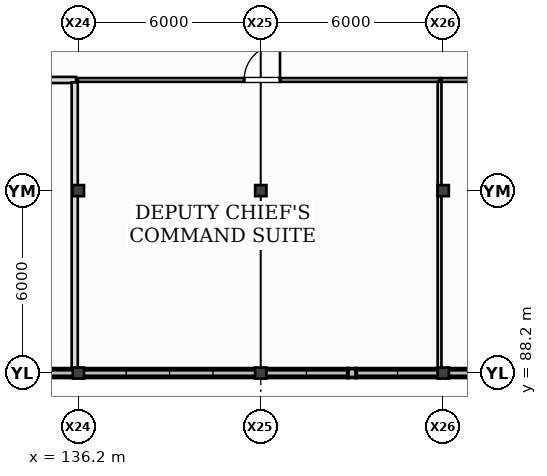
"""IFC4 building model, lengths in metres.
Left out: names, types, materials, properties, quantities, classifications, styles, units other than length and angle.
Written with IfcOpenShell. Run it as: python <this file> out.ifc"""

import sys

from ifc_helpers import new_model, si_unit, direction, frame, frame_2d, origin, origin_2d, place, context, subcontext, project, spatial, rectangle, i_section, extrude, element, fill, save


model = new_model("IFC4")
c1 = context("Model", 3, precision=1e-05, world=origin(), true_north=direction((0.0, 1.0)))
c2 = subcontext(c1, "Body", "Model", "MODEL_VIEW")
j1 = project(units=[si_unit("LENGTHUNIT", "METRE"), si_unit("PLANEANGLEUNIT", "RADIAN")], contexts=[c1])
p1 = place(None, origin())
s1 = spatial("IfcSite", under=j1, at=p1, CompositionType="ELEMENT")
p2 = place(p1, origin())
s2 = spatial("IfcBuilding", under=s1, at=p2, CompositionType="ELEMENT")
p3 = place(p2, frame((0.0, 0.0, 10.0)))
s3 = spatial("IfcBuildingStorey", under=s2, at=p3, CompositionType="ELEMENT", Elevation=10.0)
for number, where, z_axis, x_axis in (
    (1, (136.2, 88.2, 0.0), (0.0, 0.0, 1.0), (1.0, 0.0, 0.0)),
    (2, (136.2, 94.2, 0.0), (0.0, 0.0, 1.0), (1.0, 0.0, 0.0)),
    (3, (142.2, 88.2, 0.0), (0.0, 0.0, 1.0), (1.0, 0.0, 0.0)),
    (4, (142.2, 94.2, 0.0), (0.0, 0.0, 1.0), (1.0, 0.0, 0.0)),
    (5, (148.2, 88.2, 0.0), (0.0, 0.0, 1.0), (1.0, 0.0, 0.0)),
    (6, (148.2, 94.2, 0.0), (0.0, 0.0, 1.0), (1.0, 0.0, 0.0)),
):
    element("IfcColumn", number, at=place(p3, frame(where, z_axis=z_axis, x_axis=x_axis)), inside=s3, PredefinedType="COLUMN", context=c2, shape_type="SweptSolid", body=[
        extrude(i_section(OverallWidth=0.371, OverallDepth=0.364, WebThickness=0.013, FlangeThickness=0.022, at=origin_2d()), origin(), (0.0, 0.0, 1.0), 4.0),
    ])
p4 = place(p3, frame((133.34, 88.2, 0.0), z_axis=(0.0, 0.0, 1.0), x_axis=(1.0, 0.0, 0.0)))
e7 = element("IfcWall", 7, at=p4, inside=s3, PredefinedType="STANDARD", context=c2, shape_type="SweptSolid", body=[
    extrude(rectangle(XDim=2.715, YDim=0.29, at=frame_2d((1.357, 0.0))), origin(), (0.0, 0.0, 1.0), 0.44),
])
p5 = place(p3, frame((136.345, 88.2, 0.0), z_axis=(0.0, 0.0, 1.0), x_axis=(1.0, 0.0, 0.0)))
e8 = element("IfcWall", 8, at=p5, inside=s3, PredefinedType="STANDARD", context=c2, shape_type="SweptSolid", body=[
    extrude(rectangle(XDim=5.71, YDim=0.29, at=frame_2d((2.855, 0.0))), origin(), (0.0, 0.0, 1.0), 0.56),
])
p6 = place(p3, frame((145.06, 88.2, 0.0), z_axis=(0.0, 0.0, 1.0), x_axis=(1.0, 0.0, 0.0)))
e9 = element("IfcWall", 9, at=p6, inside=s3, PredefinedType="STANDARD", context=c2, shape_type="SweptSolid", body=[
    extrude(rectangle(XDim=0.28, YDim=0.29, at=frame_2d((0.14, 0.0))), origin(), (0.0, 0.0, 1.0), 3.249),
])
p7 = place(p3, frame((142.345, 88.2, 0.0), z_axis=(0.0, 0.0, 1.0), x_axis=(1.0, 0.0, 0.0)))
e10 = element("IfcWall", 10, at=p7, inside=s3, PredefinedType="STANDARD", context=c2, shape_type="SweptSolid", body=[
    extrude(rectangle(XDim=2.715, YDim=0.29, at=frame_2d((1.357, 0.0))), origin(), (0.0, 0.0, 1.0), 0.68),
])
p8 = place(p3, frame((145.34, 88.2, 0.0), z_axis=(0.0, 0.0, 1.0), x_axis=(1.0, 0.0, 0.0)))
e11 = element("IfcWall", 11, at=p8, inside=s3, PredefinedType="STANDARD", context=c2, shape_type="SweptSolid", body=[
    extrude(rectangle(XDim=2.715, YDim=0.29, at=frame_2d((1.357, 0.0))), origin(), (0.0, 0.0, 1.0), 0.8),
])
p9 = place(p3, frame((148.345, 88.2, 0.0), z_axis=(0.0, 0.0, 1.0), x_axis=(1.0, 0.0, 0.0)))
e12 = element("IfcWall", 12, at=p9, inside=s3, PredefinedType="STANDARD", context=c2, shape_type="SweptSolid", body=[
    extrude(rectangle(XDim=5.71, YDim=0.29, at=frame_2d((2.855, 0.0))), origin(), (0.0, 0.0, 1.0), 0.92),
])
p10 = place(p3, frame((124.345, 97.84, 0.0), z_axis=(0.0, 0.0, 1.0), x_axis=(1.0, 0.0, 0.0)))
e13 = element("IfcWall", 13, at=p10, inside=s3, PredefinedType="PARTITIONING", context=c2, shape_type="SweptSolid", body=[
    extrude(rectangle(XDim=11.775, YDim=0.2, at=frame_2d((5.888, 0.0))), origin(), (0.0, 0.0, 1.0), 3.74),
])
p11 = place(p10, frame((5.258, 0.0, 0.0)))
e14 = element("IfcOpeningElement", 14, at=p11, cuts=e13, PredefinedType="OPENING", context=c2, shape_type="SweptSolid", body=[
    extrude(rectangle(XDim=1.26, YDim=2.2, at=frame_2d((0.63, 1.1))), frame((0.0, 0.11, 0.0), z_axis=(0.0, -1.0, 0.0), x_axis=(1.0, 0.0, 0.0)), (0.0, 0.0, 1.0), 0.22),
])
p12 = place(p3, frame((136.08, 97.76, 0.0), z_axis=(0.0, 0.0, 1.0), x_axis=(0.0, -1.0, 0.0)))
e15 = element("IfcWall", 15, at=p12, inside=s3, PredefinedType="PARTITIONING", context=c2, shape_type="SweptSolid", body=[
    extrude(rectangle(XDim=9.415, YDim=0.2, at=frame_2d((4.708, 0.0))), origin(), (0.0, 0.0, 1.0), 3.253),
])
p13 = place(p3, frame((136.18, 97.84, 0.0), z_axis=(0.0, 0.0, 1.0), x_axis=(1.0, 0.0, 0.0)))
e16 = element("IfcWall", 16, at=p13, inside=s3, PredefinedType="PARTITIONING", context=c2, shape_type="SweptSolid", body=[
    extrude(rectangle(XDim=11.903, YDim=0.125, at=frame_2d((5.951, 0.0))), origin(), (0.0, 0.0, 1.0), 3.74),
])
p14 = place(p13, frame((5.472, 0.0, 0.0)))
e17 = element("IfcOpeningElement", 17, at=p14, cuts=e16, PredefinedType="OPENING", context=c2, shape_type="SweptSolid", body=[
    extrude(rectangle(XDim=1.18, YDim=2.16, at=frame_2d((0.59, 1.08))), frame((0.0, 0.073, 0.0), z_axis=(0.0, -1.0, 0.0), x_axis=(1.0, 0.0, 0.0)), (0.0, 0.0, 1.0), 0.145),
])
p15 = place(p3, frame((148.08, 97.778, 0.0), z_axis=(0.0, 0.0, 1.0), x_axis=(0.0, -1.0, 0.0)))
e18 = element("IfcWall", 18, at=p15, inside=s3, PredefinedType="PARTITIONING", context=c2, shape_type="SweptSolid", body=[
    extrude(rectangle(XDim=9.433, YDim=0.125, at=frame_2d((4.716, 0.0))), origin(), (0.0, 0.0, 1.0), 3.253),
])
p16 = place(p3, frame((148.143, 97.84, 0.0), z_axis=(0.0, 0.0, 1.0), x_axis=(1.0, 0.0, 0.0)))
e19 = element("IfcWall", 19, at=p16, inside=s3, PredefinedType="PARTITIONING", context=c2, shape_type="SweptSolid", body=[
    extrude(rectangle(XDim=11.912, YDim=0.125, at=frame_2d((5.956, 0.0))), origin(), (0.0, 0.0, 1.0), 3.74),
])
p17 = place(p16, frame((5.318, 0.0, 0.0)))
e20 = element("IfcOpeningElement", 20, at=p17, cuts=e19, PredefinedType="OPENING", context=c2, shape_type="SweptSolid", body=[
    extrude(rectangle(XDim=1.5, YDim=2.22, at=frame_2d((0.75, 1.11))), frame((0.0, 0.073, 0.0), z_axis=(0.0, -1.0, 0.0), x_axis=(1.0, 0.0, 0.0)), (0.0, 0.0, 1.0), 0.145),
])
p18 = place(p14, frame((1.18, 0.0, 0.0), z_axis=(0.0, 0.0, 1.0), x_axis=(-1.0, 0.0, 0.0)))
e21 = element("IfcDoor", 21, at=p18, inside=s3, OperationType="SINGLE_SWING_RIGHT", PredefinedType="DOOR", context=c2, shape_type="SweptSolid", body=[
    extrude(rectangle(XDim=1.18, YDim=2.16, at=frame_2d((0.59, 1.08))), frame((0.0, 0.025, 0.0), z_axis=(0.0, -1.0, 0.0), x_axis=(1.0, 0.0, 0.0)), (0.0, 0.0, 1.0), 0.05),
])
fill(e17, e21)
save(model, sys.argv[1])
